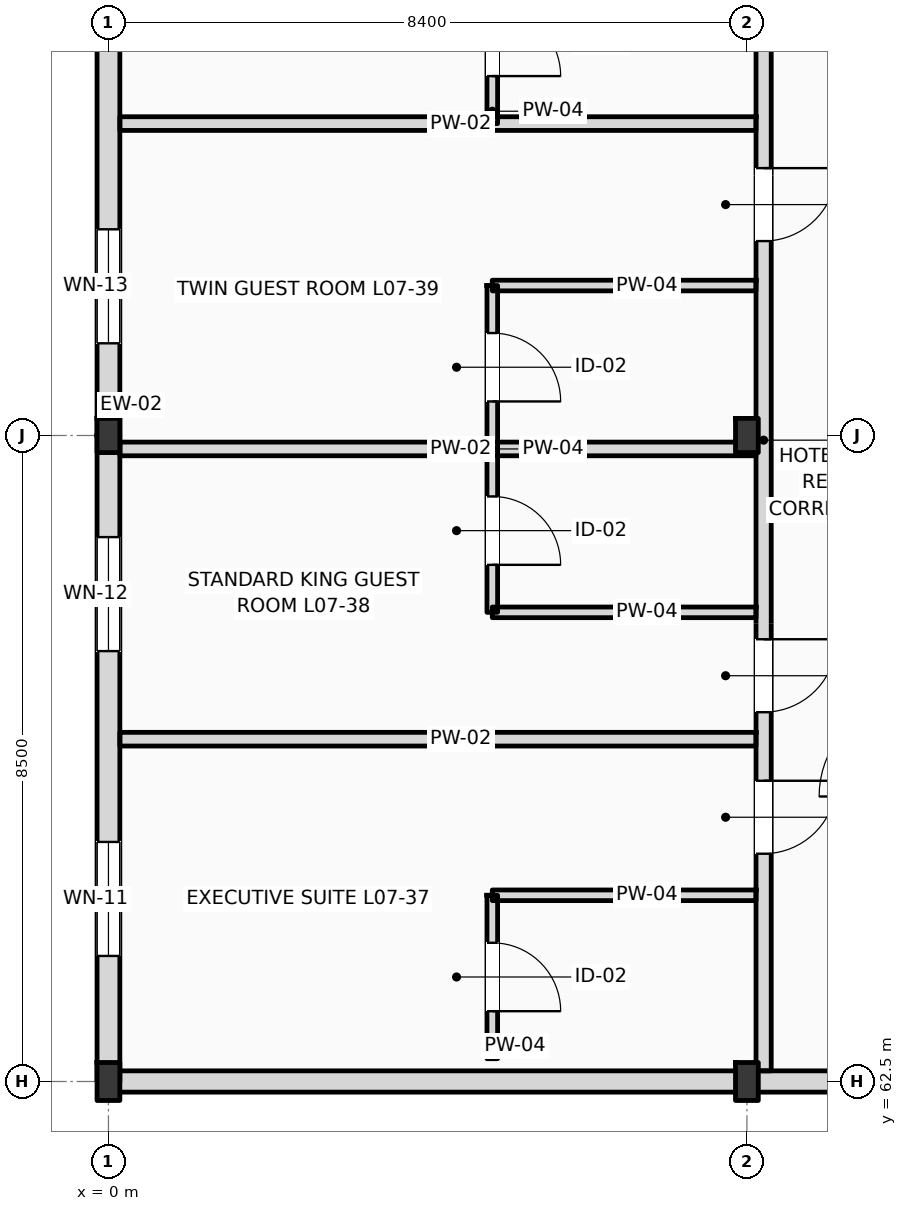
"""IFC4 building model, lengths in metres.
Left out: names, types, materials, properties, quantities, classifications, styles, units other than length and angle.
Written with IfcOpenShell. Run it as: python <this file> out.ifc"""

import sys

from ifc_helpers import new_model, si_unit, direction, frame, frame_2d, origin, origin_2d, place, context, subcontext, project, spatial, rectangle, i_section, extrude, element, fill, save


model = new_model("IFC4")
c1 = context("Model", 3, precision=1e-05, world=origin(), true_north=direction((0.0, 1.0)))
c2 = subcontext(c1, "Body", "Model", "MODEL_VIEW")
j1 = project(units=[si_unit("LENGTHUNIT", "METRE"), si_unit("PLANEANGLEUNIT", "RADIAN")], contexts=[c1])
p1 = place(None, origin())
s1 = spatial("IfcSite", under=j1, at=p1, CompositionType="ELEMENT")
p2 = place(p1, origin())
s2 = spatial("IfcBuilding", under=s1, at=p2, CompositionType="ELEMENT")
p3 = place(p2, frame((0.0, 0.0, 31.8)))
s3 = spatial("IfcBuildingStorey", under=s2, at=p3, CompositionType="ELEMENT", Elevation=31.8)
p4 = place(p3, frame((0.0, 62.5, 0.0), z_axis=(0.0, 0.0, 1.0), x_axis=(1.0, 0.0, 0.0)))
e1 = element("IfcColumn", 1, at=p4, inside=s3, PredefinedType="COLUMN", context=c2, shape_type="SweptSolid", body=[
    extrude(i_section(OverallWidth=0.3, OverallDepth=0.5, WebThickness=0.014, FlangeThickness=0.028, FilletRadius=0.027, at=origin_2d()), origin(), (0.0, 0.0, 1.0), 3.6),
])
p5 = place(p3, frame((0.0, 71.0, 0.0), z_axis=(0.0, 0.0, 1.0), x_axis=(1.0, 0.0, 0.0)))
e2 = element("IfcColumn", 2, at=p5, inside=s3, PredefinedType="COLUMN", context=c2, shape_type="SweptSolid", body=[
    extrude(i_section(OverallWidth=0.3, OverallDepth=0.45, WebThickness=0.014, FlangeThickness=0.026, FilletRadius=0.027, at=origin_2d()), origin(), (0.0, 0.0, 1.0), 3.6),
])
p6 = place(p3, frame((8.4, 62.5, 0.0), z_axis=(0.0, 0.0, 1.0), x_axis=(1.0, 0.0, 0.0)))
e3 = element("IfcColumn", 3, at=p6, inside=s3, PredefinedType="COLUMN", context=c2, shape_type="SweptSolid", body=[
    extrude(i_section(OverallWidth=0.3, OverallDepth=0.5, WebThickness=0.014, FlangeThickness=0.028, FilletRadius=0.027, at=origin_2d()), origin(), (0.0, 0.0, 1.0), 3.6),
])
p7 = place(p3, frame((8.4, 71.0, 0.0), z_axis=(0.0, 0.0, 1.0), x_axis=(1.0, 0.0, 0.0)))
e4 = element("IfcColumn", 4, at=p7, inside=s3, PredefinedType="COLUMN", context=c2, shape_type="SweptSolid", body=[
    extrude(i_section(OverallWidth=0.3, OverallDepth=0.45, WebThickness=0.014, FlangeThickness=0.026, FilletRadius=0.027, at=origin_2d()), origin(), (0.0, 0.0, 1.0), 3.6),
])
p8 = place(p3, frame((0.0, 62.5, 0.0), z_axis=(0.0, 0.0, 1.0), x_axis=(0.0, 1.0, 0.0)))
e5 = element("IfcWall", 5, at=p8, inside=s3, PredefinedType="STANDARD", context=c2, shape_type="SweptSolid", body=[
    extrude(rectangle(XDim=8.5, YDim=0.3, at=frame_2d((4.25, 0.0))), origin(), (0.0, 0.0, 1.0), 2.99),
])
p9 = place(p8, frame((1.652, 0.0, 0.9)))
e6 = element("IfcOpeningElement", 6, at=p9, cuts=e5, PredefinedType="OPENING", context=c2, shape_type="SweptSolid", body=[
    extrude(rectangle(XDim=1.5, YDim=1.91, at=frame_2d((0.75, 0.955))), frame((0.0, 0.16, 0.0), z_axis=(0.0, -1.0, 0.0), x_axis=(1.0, 0.0, 0.0)), (0.0, 0.0, 1.0), 0.32),
])
p10 = place(p8, frame((5.663, 0.0, 0.9)))
e7 = element("IfcOpeningElement", 7, at=p10, cuts=e5, PredefinedType="OPENING", context=c2, shape_type="SweptSolid", body=[
    extrude(rectangle(XDim=1.5, YDim=1.91, at=frame_2d((0.75, 0.955))), frame((0.0, 0.16, 0.0), z_axis=(0.0, -1.0, 0.0), x_axis=(1.0, 0.0, 0.0)), (0.0, 0.0, 1.0), 0.32),
])
p11 = place(p3, frame((0.0, 71.0, 0.0), z_axis=(0.0, 0.0, 1.0), x_axis=(0.0, 1.0, 0.0)))
e8 = element("IfcWall", 8, at=p11, inside=s3, PredefinedType="STANDARD", context=c2, shape_type="SweptSolid", body=[
    extrude(rectangle(XDim=8.5, YDim=0.3, at=frame_2d((4.25, 0.0))), origin(), (0.0, 0.0, 1.0), 2.99),
])
p12 = place(p11, frame((1.213, 0.0, 0.9)))
e9 = element("IfcOpeningElement", 9, at=p12, cuts=e8, PredefinedType="OPENING", context=c2, shape_type="SweptSolid", body=[
    extrude(rectangle(XDim=1.5, YDim=1.91, at=frame_2d((0.75, 0.955))), frame((0.0, 0.16, 0.0), z_axis=(0.0, -1.0, 0.0), x_axis=(1.0, 0.0, 0.0)), (0.0, 0.0, 1.0), 0.32),
])
p13 = place(p11, frame((5.263, 0.0, 0.9)))
e10 = element("IfcOpeningElement", 10, at=p13, cuts=e8, PredefinedType="OPENING", context=c2, shape_type="SweptSolid", body=[
    extrude(rectangle(XDim=1.5, YDim=1.91, at=frame_2d((0.75, 0.955))), frame((0.0, 0.16, 0.0), z_axis=(0.0, -1.0, 0.0), x_axis=(1.0, 0.0, 0.0)), (0.0, 0.0, 1.0), 0.32),
])
p14 = place(p3, frame((0.0, 62.5, 0.0), z_axis=(0.0, 0.0, 1.0), x_axis=(1.0, 0.0, 0.0)))
e11 = element("IfcWall", 11, at=p14, inside=s3, PredefinedType="STANDARD", context=c2, shape_type="SweptSolid", body=[
    extrude(rectangle(XDim=25.2, YDim=0.28, at=frame_2d((12.6, 0.0))), origin(), (0.0, 0.0, 1.0), 2.8),
])
p15 = place(p3, frame((8.62, 62.64, 0.0), z_axis=(0.0, 0.0, 1.0), x_axis=(0.0, 1.0, 0.0)))
e12 = element("IfcWall", 12, at=p15, inside=s3, PredefinedType="PARTITIONING", context=c2, shape_type="SweptSolid", body=[
    extrude(rectangle(XDim=32.66, YDim=0.2, at=frame_2d((16.33, 0.0))), origin(), (0.0, 0.0, 1.0), 2.99),
])
p16 = place(p15, frame((2.857, 0.0, 0.0)))
e13 = element("IfcOpeningElement", 13, at=p16, cuts=e12, PredefinedType="OPENING", context=c2, shape_type="SweptSolid", body=[
    extrude(rectangle(XDim=0.96, YDim=2.2, at=frame_2d((0.48, 1.1))), frame((0.0, 0.11, 0.0), z_axis=(0.0, -1.0, 0.0), x_axis=(1.0, 0.0, 0.0)), (0.0, 0.0, 1.0), 0.22),
])
p17 = place(p15, frame((4.719, 0.0, 0.0)))
e14 = element("IfcOpeningElement", 14, at=p17, cuts=e12, PredefinedType="OPENING", context=c2, shape_type="SweptSolid", body=[
    extrude(rectangle(XDim=0.96, YDim=2.2, at=frame_2d((0.48, 1.1))), frame((0.0, 0.11, 0.0), z_axis=(0.0, -1.0, 0.0), x_axis=(1.0, 0.0, 0.0)), (0.0, 0.0, 1.0), 0.22),
])
p18 = place(p15, frame((10.918, 0.0, 0.0)))
e15 = element("IfcOpeningElement", 15, at=p18, cuts=e12, PredefinedType="OPENING", context=c2, shape_type="SweptSolid", body=[
    extrude(rectangle(XDim=0.96, YDim=2.2, at=frame_2d((0.48, 1.1))), frame((0.0, 0.11, 0.0), z_axis=(0.0, -1.0, 0.0), x_axis=(1.0, 0.0, 0.0)), (0.0, 0.0, 1.0), 0.22),
])
p19 = place(p15, frame((14.969, 0.0, 0.0)))
e16 = element("IfcOpeningElement", 16, at=p19, cuts=e12, PredefinedType="OPENING", context=c2, shape_type="SweptSolid", body=[
    extrude(rectangle(XDim=0.96, YDim=2.2, at=frame_2d((0.48, 1.1))), frame((0.0, 0.11, 0.0), z_axis=(0.0, -1.0, 0.0), x_axis=(1.0, 0.0, 0.0)), (0.0, 0.0, 1.0), 0.22),
])
p20 = place(p15, frame((19.018, 0.0, 0.0)))
e17 = element("IfcOpeningElement", 17, at=p20, cuts=e12, PredefinedType="OPENING", context=c2, shape_type="SweptSolid", body=[
    extrude(rectangle(XDim=0.96, YDim=2.2, at=frame_2d((0.48, 1.1))), frame((0.0, 0.11, 0.0), z_axis=(0.0, -1.0, 0.0), x_axis=(1.0, 0.0, 0.0)), (0.0, 0.0, 1.0), 0.22),
])
p21 = place(p15, frame((23.068, 0.0, 0.0)))
e18 = element("IfcOpeningElement", 18, at=p21, cuts=e12, PredefinedType="OPENING", context=c2, shape_type="SweptSolid", body=[
    extrude(rectangle(XDim=0.96, YDim=2.2, at=frame_2d((0.48, 1.1))), frame((0.0, 0.11, 0.0), z_axis=(0.0, -1.0, 0.0), x_axis=(1.0, 0.0, 0.0)), (0.0, 0.0, 1.0), 0.22),
])
p22 = place(p15, frame((27.119, 0.0, 0.0)))
e19 = element("IfcOpeningElement", 19, at=p22, cuts=e12, PredefinedType="OPENING", context=c2, shape_type="SweptSolid", body=[
    extrude(rectangle(XDim=0.96, YDim=2.2, at=frame_2d((0.48, 1.1))), frame((0.0, 0.11, 0.0), z_axis=(0.0, -1.0, 0.0), x_axis=(1.0, 0.0, 0.0)), (0.0, 0.0, 1.0), 0.22),
])
p23 = place(p15, frame((31.207, 0.0, 0.0)))
e20 = element("IfcOpeningElement", 20, at=p23, cuts=e12, PredefinedType="OPENING", context=c2, shape_type="SweptSolid", body=[
    extrude(rectangle(XDim=0.96, YDim=2.2, at=frame_2d((0.48, 1.1))), frame((0.0, 0.11, 0.0), z_axis=(0.0, -1.0, 0.0), x_axis=(1.0, 0.0, 0.0)), (0.0, 0.0, 1.0), 0.22),
])
p24 = place(p3, frame((0.15, 67.004, 0.0), z_axis=(0.0, 0.0, 1.0), x_axis=(1.0, 0.0, 0.0)))
e21 = element("IfcWall", 21, at=p24, inside=s3, PredefinedType="PARTITIONING", context=c2, shape_type="SweptSolid", body=[
    extrude(rectangle(XDim=8.37, YDim=0.18, at=frame_2d((4.185, 0.0))), origin(), (0.0, 0.0, 1.0), 3.36),
])
p25 = place(p3, frame((5.05, 64.95, 0.0), z_axis=(0.0, 0.0, 1.0), x_axis=(1.0, 0.0, 0.0)))
e22 = element("IfcWall", 22, at=p25, inside=s3, PredefinedType="PARTITIONING", context=c2, shape_type="SweptSolid", body=[
    extrude(rectangle(XDim=3.47, YDim=0.14, at=frame_2d((1.735, 0.0))), origin(), (0.0, 0.0, 1.0), 3.36),
])
p26 = place(p3, frame((5.05, 62.8, 0.0), z_axis=(0.0, 0.0, 1.0), x_axis=(0.0, 1.0, 0.0)))
e23 = element("IfcWall", 23, at=p26, inside=s3, PredefinedType="PARTITIONING", context=c2, shape_type="SweptSolid", body=[
    extrude(rectangle(XDim=2.15, YDim=0.14, at=frame_2d((1.075, 0.0))), origin(), (0.0, 0.0, 1.0), 3.36),
])
p27 = place(p26, frame((0.625, 0.0, 0.0)))
e24 = element("IfcOpeningElement", 24, at=p27, cuts=e23, PredefinedType="OPENING", context=c2, shape_type="SweptSolid", body=[
    extrude(rectangle(XDim=0.9, YDim=2.1, at=frame_2d((0.45, 1.05))), frame((0.0, 0.08, 0.0), z_axis=(0.0, -1.0, 0.0), x_axis=(1.0, 0.0, 0.0)), (0.0, 0.0, 1.0), 0.16),
])
p28 = place(p3, frame((0.15, 70.823, 0.0), z_axis=(0.0, 0.0, 1.0), x_axis=(1.0, 0.0, 0.0)))
e25 = element("IfcWall", 25, at=p28, inside=s3, PredefinedType="PARTITIONING", context=c2, shape_type="SweptSolid", body=[
    extrude(rectangle(XDim=8.37, YDim=0.18, at=frame_2d((4.185, 0.0))), origin(), (0.0, 0.0, 1.0), 2.8),
])
p29 = place(p3, frame((5.05, 68.673, 0.0), z_axis=(0.0, 0.0, 1.0), x_axis=(1.0, 0.0, 0.0)))
e26 = element("IfcWall", 26, at=p29, inside=s3, PredefinedType="PARTITIONING", context=c2, shape_type="SweptSolid", body=[
    extrude(rectangle(XDim=3.47, YDim=0.14, at=frame_2d((1.735, 0.0))), origin(), (0.0, 0.0, 1.0), 3.36),
])
p30 = place(p3, frame((5.05, 68.673, 0.0), z_axis=(0.0, 0.0, 1.0), x_axis=(0.0, 1.0, 0.0)))
e27 = element("IfcWall", 27, at=p30, inside=s3, PredefinedType="PARTITIONING", context=c2, shape_type="SweptSolid", body=[
    extrude(rectangle(XDim=2.15, YDim=0.14, at=frame_2d((1.075, 0.0))), origin(), (0.0, 0.0, 1.0), 3.36),
])
p31 = place(p30, frame((0.625, 0.0, 0.0)))
e28 = element("IfcOpeningElement", 28, at=p31, cuts=e27, PredefinedType="OPENING", context=c2, shape_type="SweptSolid", body=[
    extrude(rectangle(XDim=0.9, YDim=2.1, at=frame_2d((0.45, 1.05))), frame((0.0, 0.08, 0.0), z_axis=(0.0, -1.0, 0.0), x_axis=(1.0, 0.0, 0.0)), (0.0, 0.0, 1.0), 0.16),
])
p32 = place(p3, frame((0.15, 75.104, 0.0), z_axis=(0.0, 0.0, 1.0), x_axis=(1.0, 0.0, 0.0)))
e29 = element("IfcWall", 29, at=p32, inside=s3, PredefinedType="PARTITIONING", context=c2, shape_type="SweptSolid", body=[
    extrude(rectangle(XDim=8.37, YDim=0.18, at=frame_2d((4.185, 0.0))), origin(), (0.0, 0.0, 1.0), 3.36),
])
p33 = place(p3, frame((5.05, 72.973, 0.0), z_axis=(0.0, 0.0, 1.0), x_axis=(1.0, 0.0, 0.0)))
e30 = element("IfcWall", 30, at=p33, inside=s3, PredefinedType="PARTITIONING", context=c2, shape_type="SweptSolid", body=[
    extrude(rectangle(XDim=3.47, YDim=0.14, at=frame_2d((1.735, 0.0))), origin(), (0.0, 0.0, 1.0), 3.36),
])
p34 = place(p3, frame((5.05, 70.823, 0.0), z_axis=(0.0, 0.0, 1.0), x_axis=(0.0, 1.0, 0.0)))
e31 = element("IfcWall", 31, at=p34, inside=s3, PredefinedType="PARTITIONING", context=c2, shape_type="SweptSolid", body=[
    extrude(rectangle(XDim=2.15, YDim=0.14, at=frame_2d((1.075, 0.0))), origin(), (0.0, 0.0, 1.0), 3.36),
])
p35 = place(p34, frame((0.625, 0.0, 0.0)))
e32 = element("IfcOpeningElement", 32, at=p35, cuts=e31, PredefinedType="OPENING", context=c2, shape_type="SweptSolid", body=[
    extrude(rectangle(XDim=0.9, YDim=2.1, at=frame_2d((0.45, 1.05))), frame((0.0, 0.08, 0.0), z_axis=(0.0, -1.0, 0.0), x_axis=(1.0, 0.0, 0.0)), (0.0, 0.0, 1.0), 0.16),
])
p36 = place(p3, frame((5.05, 75.104, 0.0), z_axis=(0.0, 0.0, 1.0), x_axis=(0.0, 1.0, 0.0)))
e33 = element("IfcWall", 33, at=p36, inside=s3, PredefinedType="PARTITIONING", context=c2, shape_type="SweptSolid", body=[
    extrude(rectangle(XDim=2.15, YDim=0.14, at=frame_2d((1.075, 0.0))), origin(), (0.0, 0.0, 1.0), 3.36),
])
p37 = place(p36, frame((0.625, 0.0, 0.0)))
e34 = element("IfcOpeningElement", 34, at=p37, cuts=e33, PredefinedType="OPENING", context=c2, shape_type="SweptSolid", body=[
    extrude(rectangle(XDim=0.9, YDim=2.1, at=frame_2d((0.45, 1.05))), frame((0.0, 0.08, 0.0), z_axis=(0.0, -1.0, 0.0), x_axis=(1.0, 0.0, 0.0)), (0.0, 0.0, 1.0), 0.16),
])
p38 = place(p9, origin())
e35 = element("IfcWindow", 35, at=p38, inside=s3, PartitioningType="DOUBLE_PANEL_VERTICAL", PredefinedType="WINDOW", context=c2, shape_type="SweptSolid", body=[
    extrude(rectangle(XDim=1.5, YDim=1.91, at=frame_2d((0.75, 0.955))), frame((0.0, 0.03, 0.0), z_axis=(0.0, -1.0, 0.0), x_axis=(1.0, 0.0, 0.0)), (0.0, 0.0, 1.0), 0.06),
])
fill(e6, e35)
p39 = place(p10, origin())
e36 = element("IfcWindow", 36, at=p39, inside=s3, PartitioningType="DOUBLE_PANEL_VERTICAL", PredefinedType="WINDOW", context=c2, shape_type="SweptSolid", body=[
    extrude(rectangle(XDim=1.5, YDim=1.91, at=frame_2d((0.75, 0.955))), frame((0.0, 0.03, 0.0), z_axis=(0.0, -1.0, 0.0), x_axis=(1.0, 0.0, 0.0)), (0.0, 0.0, 1.0), 0.06),
])
fill(e7, e36)
p40 = place(p12, origin())
e37 = element("IfcWindow", 37, at=p40, inside=s3, PartitioningType="DOUBLE_PANEL_VERTICAL", PredefinedType="WINDOW", context=c2, shape_type="SweptSolid", body=[
    extrude(rectangle(XDim=1.5, YDim=1.91, at=frame_2d((0.75, 0.955))), frame((0.0, 0.03, 0.0), z_axis=(0.0, -1.0, 0.0), x_axis=(1.0, 0.0, 0.0)), (0.0, 0.0, 1.0), 0.06),
])
fill(e9, e37)
p41 = place(p16, frame((0.96, 0.0, 0.0), z_axis=(0.0, 0.0, 1.0), x_axis=(-1.0, 0.0, 0.0)))
e38 = element("IfcDoor", 38, at=p41, inside=s3, OperationType="SINGLE_SWING_RIGHT", PredefinedType="DOOR", context=c2, shape_type="SweptSolid", body=[
    extrude(rectangle(XDim=0.96, YDim=2.2, at=frame_2d((0.48, 1.1))), frame((0.0, 0.025, 0.0), z_axis=(0.0, -1.0, 0.0), x_axis=(1.0, 0.0, 0.0)), (0.0, 0.0, 1.0), 0.05),
])
fill(e13, e38)
p42 = place(p27, frame((0.9, 0.0, 0.0), z_axis=(0.0, 0.0, 1.0), x_axis=(-1.0, 0.0, 0.0)))
e39 = element("IfcDoor", 39, at=p42, inside=s3, OperationType="SINGLE_SWING_LEFT", PredefinedType="DOOR", context=c2, shape_type="SweptSolid", body=[
    extrude(rectangle(XDim=0.9, YDim=2.1, at=frame_2d((0.45, 1.05))), frame((0.0, 0.025, 0.0), z_axis=(0.0, -1.0, 0.0), x_axis=(1.0, 0.0, 0.0)), (0.0, 0.0, 1.0), 0.05),
])
fill(e24, e39)
p43 = place(p17, frame((0.96, 0.0, 0.0), z_axis=(0.0, 0.0, 1.0), x_axis=(-1.0, 0.0, 0.0)))
e40 = element("IfcDoor", 40, at=p43, inside=s3, OperationType="SINGLE_SWING_RIGHT", PredefinedType="DOOR", context=c2, shape_type="SweptSolid", body=[
    extrude(rectangle(XDim=0.96, YDim=2.2, at=frame_2d((0.48, 1.1))), frame((0.0, 0.025, 0.0), z_axis=(0.0, -1.0, 0.0), x_axis=(1.0, 0.0, 0.0)), (0.0, 0.0, 1.0), 0.05),
])
fill(e14, e40)
p44 = place(p31, frame((0.9, 0.0, 0.0), z_axis=(0.0, 0.0, 1.0), x_axis=(-1.0, 0.0, 0.0)))
e41 = element("IfcDoor", 41, at=p44, inside=s3, OperationType="SINGLE_SWING_LEFT", PredefinedType="DOOR", context=c2, shape_type="SweptSolid", body=[
    extrude(rectangle(XDim=0.9, YDim=2.1, at=frame_2d((0.45, 1.05))), frame((0.0, 0.025, 0.0), z_axis=(0.0, -1.0, 0.0), x_axis=(1.0, 0.0, 0.0)), (0.0, 0.0, 1.0), 0.05),
])
fill(e28, e41)
p45 = place(p18, frame((0.96, 0.0, 0.0), z_axis=(0.0, 0.0, 1.0), x_axis=(-1.0, 0.0, 0.0)))
e42 = element("IfcDoor", 42, at=p45, inside=s3, OperationType="SINGLE_SWING_RIGHT", PredefinedType="DOOR", context=c2, shape_type="SweptSolid", body=[
    extrude(rectangle(XDim=0.96, YDim=2.2, at=frame_2d((0.48, 1.1))), frame((0.0, 0.025, 0.0), z_axis=(0.0, -1.0, 0.0), x_axis=(1.0, 0.0, 0.0)), (0.0, 0.0, 1.0), 0.05),
])
fill(e15, e42)
p46 = place(p35, frame((0.9, 0.0, 0.0), z_axis=(0.0, 0.0, 1.0), x_axis=(-1.0, 0.0, 0.0)))
e43 = element("IfcDoor", 43, at=p46, inside=s3, OperationType="SINGLE_SWING_LEFT", PredefinedType="DOOR", context=c2, shape_type="SweptSolid", body=[
    extrude(rectangle(XDim=0.9, YDim=2.1, at=frame_2d((0.45, 1.05))), frame((0.0, 0.025, 0.0), z_axis=(0.0, -1.0, 0.0), x_axis=(1.0, 0.0, 0.0)), (0.0, 0.0, 1.0), 0.05),
])
fill(e32, e43)
p47 = place(p37, frame((0.9, 0.0, 0.0), z_axis=(0.0, 0.0, 1.0), x_axis=(-1.0, 0.0, 0.0)))
e44 = element("IfcDoor", 44, at=p47, inside=s3, OperationType="SINGLE_SWING_LEFT", PredefinedType="DOOR", context=c2, shape_type="SweptSolid", body=[
    extrude(rectangle(XDim=0.9, YDim=2.1, at=frame_2d((0.45, 1.05))), frame((0.0, 0.025, 0.0), z_axis=(0.0, -1.0, 0.0), x_axis=(1.0, 0.0, 0.0)), (0.0, 0.0, 1.0), 0.05),
])
fill(e34, e44)
save(model, sys.argv[1])
